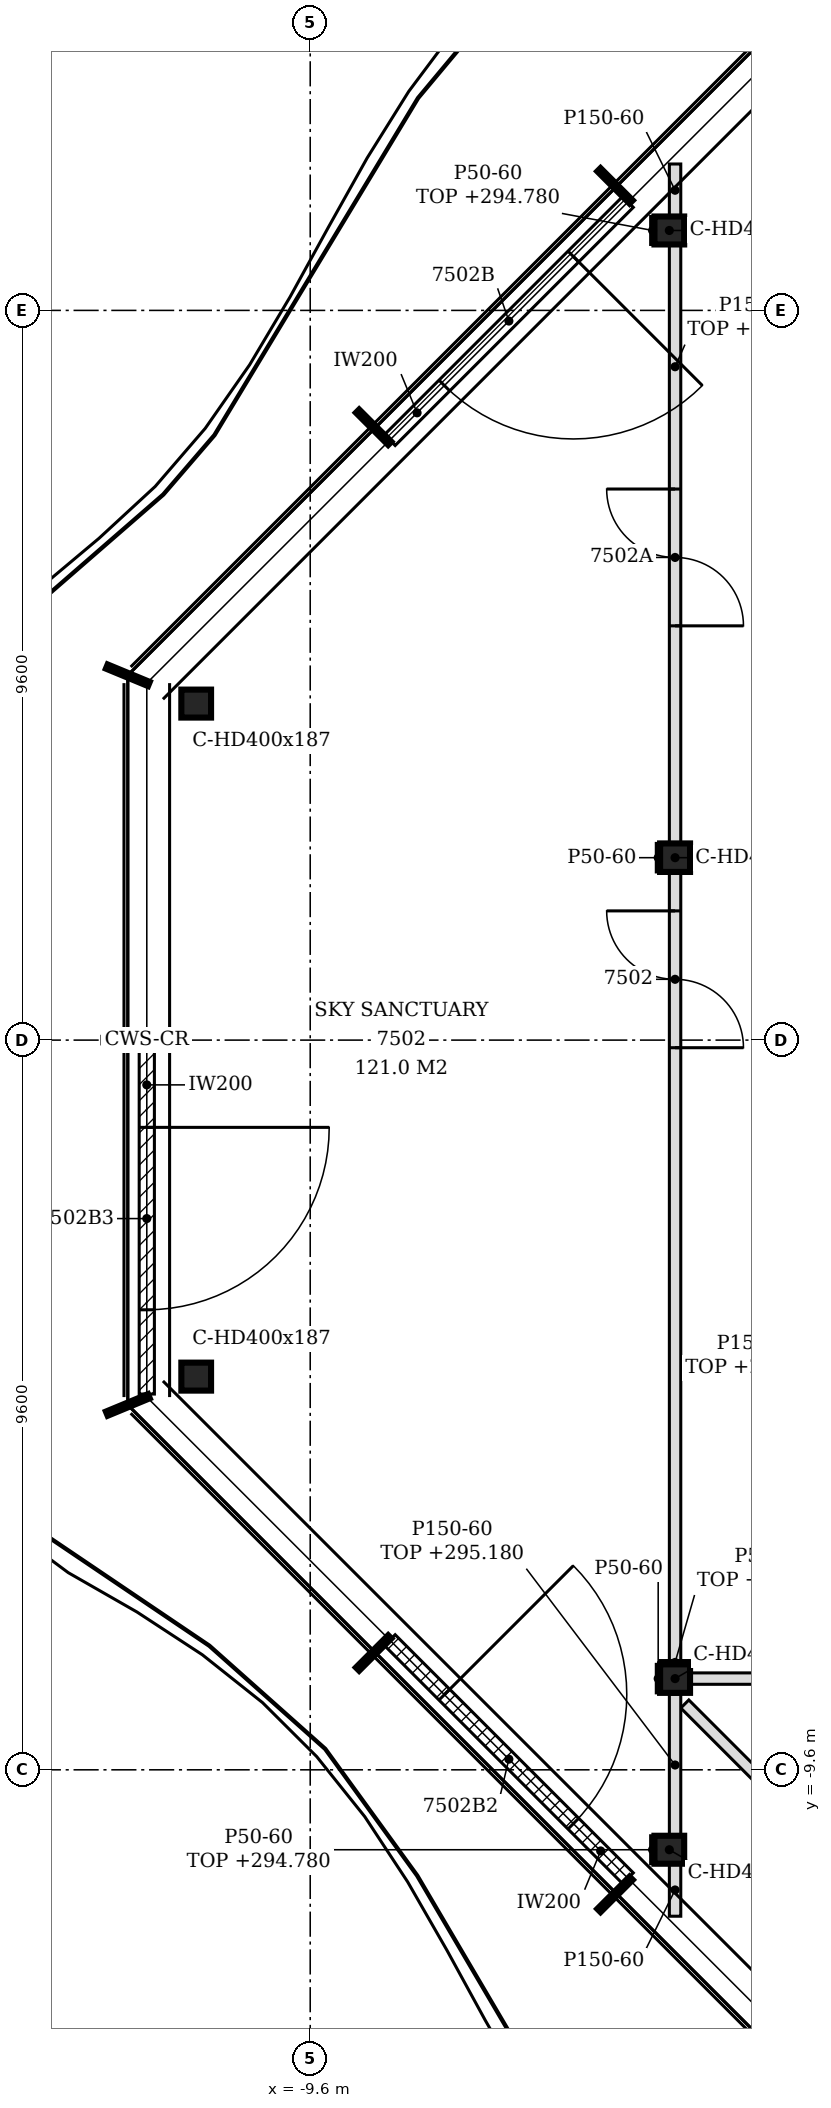
"""IFC4 building model, lengths in metres.
Left out: names, types, materials, properties, quantities, classifications, styles, units other than length and angle.
Written with IfcOpenShell. Run it as: python <this file> out.ifc"""

import sys

from ifc_helpers import new_model, si_unit, direction, frame, frame_2d, origin, origin_2d, place, context, subcontext, project, spatial, polyline, rectangle, i_section, outline, extrude, element, fill, save


model = new_model("IFC4")
c1 = context("Model", 3, precision=1e-05, world=origin(), true_north=direction((0.0, 1.0)))
c2 = subcontext(c1, "Body", "Model", "MODEL_VIEW")
j1 = project(units=[si_unit("LENGTHUNIT", "METRE"), si_unit("PLANEANGLEUNIT", "RADIAN")], contexts=[c1])
p1 = place(None, origin())
s1 = spatial("IfcSite", under=j1, at=p1, CompositionType="ELEMENT")
p2 = place(p1, origin())
s2 = spatial("IfcBuilding", under=s1, at=p2, CompositionType="ELEMENT")
p3 = place(p2, frame((0.0, 0.0, 292.2)))
s3 = spatial("IfcBuildingStorey", under=s2, at=p3, CompositionType="ELEMENT", Elevation=292.2)
for number, where, z_axis, x_axis in (
    (1, (-4.876, 10.652, -0.15), (0.0, 0.0, 1.0), (1.0, 0.0, 0.0)),
    (2, (-11.1, 4.427, -0.15), (0.0, 0.0, 1.0), (1.0, 0.0, 0.0)),
    (3, (-11.1, -4.427, -0.15), (0.0, 0.0, 1.0), (1.0, 0.0, 0.0)),
    (4, (-4.876, -10.652, -0.15), (0.0, 0.0, 1.0), (1.0, 0.0, 0.0)),
):
    element("IfcColumn", number, at=place(p3, frame(where, z_axis=z_axis, x_axis=x_axis)), inside=s3, PredefinedType="COLUMN", context=c2, shape_type="SweptSolid", body=[
        extrude(i_section(OverallWidth=0.391, OverallDepth=0.368, WebThickness=0.015, FlangeThickness=0.024, FilletRadius=0.015, at=origin_2d()), origin(), (0.0, 0.0, 1.0), 3.55),
    ])
for number, where, z_axis, x_axis in (
    (5, (-4.8, -8.4, -0.15), (0.0, 0.0, 1.0), (1.0, 0.0, 0.0)),
    (6, (-4.8, 2.4, -0.15), (0.0, 0.0, 1.0), (1.0, 0.0, 0.0)),
):
    element("IfcColumn", number, at=place(p3, frame(where, z_axis=z_axis, x_axis=x_axis)), inside=s3, PredefinedType="COLUMN", context=c2, shape_type="SweptSolid", body=[
        extrude(i_section(OverallWidth=0.394, OverallDepth=0.375, WebThickness=0.017, FlangeThickness=0.028, FilletRadius=0.015, at=origin_2d()), origin(), (0.0, 0.0, 1.0), 3.55),
    ])
p4 = place(p3, frame((-5.42, 11.026, 0.0), z_axis=(0.0, 0.0, 1.0), x_axis=(-0.707134329907, -0.707079231393, 0.0)))
e7 = element("IfcWall", 7, at=p4, inside=s3, PredefinedType="NOTDEFINED", context=c2, shape_type="SweptSolid", body=[
    extrude(rectangle(XDim=4.431, YDim=0.2, at=frame_2d((2.215, 0.0))), origin(), (0.0, 0.0, 1.0), 3.4),
])
p5 = place(p4, frame((1.015, 0.0, 0.0)))
e8 = element("IfcOpeningElement", 8, at=p5, cuts=e7, PredefinedType="OPENING", context=c2, shape_type="SweptSolid", body=[
    extrude(rectangle(XDim=2.4, YDim=2.4, at=frame_2d((1.2, 1.2))), frame((0.0, 0.11, 0.0), z_axis=(0.0, -1.0, 0.0), x_axis=(1.0, 0.0, 0.0)), (0.0, 0.0, 1.0), 0.22),
])
p6 = place(p3, frame((-11.75, -0.03, 0.0), z_axis=(0.0, 0.0, 1.0), x_axis=(0.0, -1.0, 0.0)))
e9 = element("IfcWall", 9, at=p6, inside=s3, PredefinedType="NOTDEFINED", context=c2, shape_type="SweptSolid", body=[
    extrude(rectangle(XDim=4.626, YDim=0.2, at=frame_2d((2.313, 0.0))), origin(), (0.0, 0.0, 1.0), 3.4),
])
p7 = place(p6, frame((1.118, 0.0, 0.0)))
e10 = element("IfcOpeningElement", 10, at=p7, cuts=e9, PredefinedType="OPENING", context=c2, shape_type="SweptSolid", body=[
    extrude(rectangle(XDim=2.4, YDim=2.4, at=frame_2d((1.2, 1.2))), frame((0.0, 0.11, 0.0), z_axis=(0.0, -1.0, 0.0), x_axis=(1.0, 0.0, 0.0)), (0.0, 0.0, 1.0), 0.22),
])
p8 = place(p3, frame((-8.553, -7.893, 0.0), z_axis=(0.0, 0.0, 1.0), x_axis=(0.707134329907, -0.707079231393, 0.0)))
e11 = element("IfcWall", 11, at=p8, inside=s3, PredefinedType="NOTDEFINED", context=c2, shape_type="SweptSolid", body=[
    extrude(rectangle(XDim=4.431, YDim=0.2, at=frame_2d((2.215, 0.0))), origin(), (0.0, 0.0, 1.0), 3.4),
])
p9 = place(p8, frame((1.015, 0.0, 0.0)))
e12 = element("IfcOpeningElement", 12, at=p9, cuts=e11, PredefinedType="OPENING", context=c2, shape_type="SweptSolid", body=[
    extrude(rectangle(XDim=2.4, YDim=2.4, at=frame_2d((1.2, 1.2))), frame((0.0, 0.11, 0.0), z_axis=(0.0, -1.0, 0.0), x_axis=(1.0, 0.0, 0.0)), (0.0, 0.0, 1.0), 0.22),
])
p10 = place(p3, frame((-1.534, -11.872, 0.0), z_axis=(0.0, 0.0, 1.0), x_axis=(-0.707106781187, 0.707106781187, 0.0)))
e13 = element("IfcWall", 13, at=p10, inside=s3, PredefinedType="PARTITIONING", context=c2, shape_type="SweptSolid", body=[
    extrude(rectangle(XDim=4.438, YDim=0.15, at=frame_2d((2.219, 0.0))), origin(), (0.0, 0.0, 1.0), 2.98),
])
p11 = place(p3, frame((-4.8, -11.526, 0.0), z_axis=(0.0, 0.0, 1.0), x_axis=(0.0, 1.0, 0.0)))
e14 = element("IfcWall", 14, at=p11, inside=s3, PredefinedType="PARTITIONING", context=c2, shape_type="SweptSolid", body=[
    extrude(outline(polyline([(0.0, 0.0), (0.691, 0.0), (0.691, 2.58), (0.229, 2.58), (0.227, 3.4), (0.0, 3.4), (0.0, 0.0)])), frame((0.0, 0.075, 0.0), z_axis=(0.0, -1.0, 0.0), x_axis=(1.0, 0.0, 0.0)), (0.0, 0.0, 1.0), 0.15),
])
p12 = place(p3, frame((-4.8, -10.468, 0.0), z_axis=(0.0, 0.0, 1.0), x_axis=(0.0, 1.0, 0.0)))
e15 = element("IfcWall", 15, at=p12, inside=s3, PredefinedType="PARTITIONING", context=c2, shape_type="SweptSolid", body=[
    extrude(outline(polyline([(0.0, 0.0), (1.862, 0.0), (1.862, 2.98), (0.31, 2.98), (0.308, 2.58), (0.066, 2.58), (0.064, 2.98), (0.0, 2.98), (0.0, 0.0)])), frame((0.0, 0.075, 0.0), z_axis=(0.0, -1.0, 0.0), x_axis=(1.0, 0.0, 0.0)), (0.0, 0.0, 1.0), 0.15),
])
p13 = place(p3, frame((-4.603, -8.4, 0.0), z_axis=(0.0, 0.0, 1.0), x_axis=(1.0, 0.0, 0.0)))
e16 = element("IfcWall", 16, at=p13, inside=s3, PredefinedType="PARTITIONING", context=c2, shape_type="SweptSolid", body=[
    extrude(rectangle(XDim=9.478, YDim=0.15, at=frame_2d((4.739, 0.0))), origin(), (0.0, 0.0, 1.0), 2.78),
])
p14 = place(p13, frame((4.153, 0.0, 0.0)))
e17 = element("IfcOpeningElement", 17, at=p14, cuts=e16, PredefinedType="OPENING", context=c2, shape_type="SweptSolid", body=[
    extrude(rectangle(XDim=0.9, YDim=2.1, at=frame_2d((0.45, 1.05))), frame((0.0, 0.085, 0.0), z_axis=(0.0, -1.0, 0.0), x_axis=(1.0, 0.0, 0.0)), (0.0, 0.0, 1.0), 0.17),
])
p15 = place(p3, frame((-4.8, -8.212, 0.0), z_axis=(0.0, 0.0, 1.0), x_axis=(0.0, 1.0, 0.0)))
e18 = element("IfcWall", 18, at=p15, inside=s3, PredefinedType="PARTITIONING", context=c2, shape_type="SweptSolid", body=[
    extrude(rectangle(XDim=10.425, YDim=0.15, at=frame_2d((5.212, 0.0))), origin(), (0.0, 0.0, 1.0), 2.78),
])
p16 = place(p15, frame((8.113, 0.0, 0.0)))
e19 = element("IfcOpeningElement", 19, at=p16, cuts=e18, PredefinedType="OPENING", context=c2, shape_type="SweptSolid", body=[
    extrude(rectangle(XDim=1.8, YDim=2.1, at=frame_2d((0.9, 1.05))), frame((0.0, 0.085, 0.0), z_axis=(0.0, -1.0, 0.0), x_axis=(1.0, 0.0, 0.0)), (0.0, 0.0, 1.0), 0.17),
])
p17 = place(p3, frame((-4.8, 2.587, 0.0), z_axis=(0.0, 0.0, 1.0), x_axis=(0.0, 1.0, 0.0)))
e20 = element("IfcWall", 20, at=p17, inside=s3, PredefinedType="PARTITIONING", context=c2, shape_type="SweptSolid", body=[
    extrude(outline(polyline([(0.0, 0.0), (7.88, 0.0), (7.88, 2.88), (7.814, 2.88), (7.812, 2.58), (7.57, 2.58), (7.568, 2.88), (0.0, 2.88), (0.0, 0.0)])), frame((0.0, 0.075, 0.0), z_axis=(0.0, -1.0, 0.0), x_axis=(1.0, 0.0, 0.0)), (0.0, 0.0, 1.0), 0.15),
])
p18 = place(p17, frame((2.863, 0.0, 0.0)))
e21 = element("IfcOpeningElement", 21, at=p18, cuts=e20, PredefinedType="OPENING", context=c2, shape_type="SweptSolid", body=[
    extrude(rectangle(XDim=1.8, YDim=2.1, at=frame_2d((0.9, 1.05))), frame((0.0, 0.085, 0.0), z_axis=(0.0, -1.0, 0.0), x_axis=(1.0, 0.0, 0.0)), (0.0, 0.0, 1.0), 0.17),
])
p19 = place(p3, frame((-4.8, 10.835, 0.0), z_axis=(0.0, 0.0, 1.0), x_axis=(0.0, 1.0, 0.0)))
e22 = element("IfcWall", 22, at=p19, inside=s3, PredefinedType="PARTITIONING", context=c2, shape_type="SweptSolid", body=[
    extrude(outline(polyline([(0.0, 0.0), (0.691, 0.0), (0.691, 3.4), (0.462, 3.4), (0.46, 2.58), (0.0, 2.58), (0.0, 0.0)])), frame((0.0, 0.075, 0.0), z_axis=(0.0, -1.0, 0.0), x_axis=(1.0, 0.0, 0.0)), (0.0, 0.0, 1.0), 0.15),
])
p20 = place(p3, frame((-5.096, -10.835, 0.0), z_axis=(0.0, 0.0, 1.0), x_axis=(0.0, 1.0, 0.0)))
e23 = element("IfcWall", 23, at=p20, inside=s3, PredefinedType="PARTITIONING", context=c2, shape_type="SweptSolid", body=[
    extrude(rectangle(XDim=0.368, YDim=0.05, at=frame_2d((0.184, 0.0))), origin(), (0.0, 0.0, 1.0), 2.58),
])
for number, where, z_axis, x_axis in (
    (24, (-5.022, -8.587, 0.0), (0.0, 0.0, 1.0), (0.0, 1.0, 0.0)),
    (25, (-5.022, 2.212, 0.0), (0.0, 0.0, 1.0), (0.0, 1.0, 0.0)),
):
    element("IfcWall", number, at=place(p3, frame(where, z_axis=z_axis, x_axis=x_axis)), inside=s3, PredefinedType="PARTITIONING", context=c2, shape_type="SweptSolid", body=[
        extrude(rectangle(XDim=0.375, YDim=0.05, at=frame_2d((0.188, 0.0))), origin(), (0.0, 0.0, 1.0), 3.4),
    ])
p21 = place(p3, frame((-5.096, 10.468, 0.0), z_axis=(0.0, 0.0, 1.0), x_axis=(0.0, 1.0, 0.0)))
e26 = element("IfcWall", 26, at=p21, inside=s3, PredefinedType="PARTITIONING", context=c2, shape_type="SweptSolid", body=[
    extrude(rectangle(XDim=0.368, YDim=0.05, at=frame_2d((0.184, 0.0))), origin(), (0.0, 0.0, 1.0), 2.58),
])
p22 = place(p3, frame((-4.997, -8.188, 0.0), z_axis=(0.0, 0.0, 1.0), x_axis=(1.0, 0.0, 0.0)))
e27 = element("IfcWall", 27, at=p22, inside=s3, PredefinedType="PARTITIONING", context=c2, shape_type="SweptSolid", body=[
    extrude(rectangle(XDim=0.394, YDim=0.05, at=frame_2d((0.197, 0.0))), origin(), (0.0, 0.0, 1.0), 2.78),
])
p23 = place(p5, origin())
e28 = element("IfcDoor", 28, at=p23, inside=s3, OperationType="SINGLE_SWING_LEFT", PredefinedType="DOOR", context=c2, shape_type="SweptSolid", body=[
    extrude(rectangle(XDim=2.4, YDim=2.4, at=frame_2d((1.2, 1.2))), frame((0.0, 0.025, 0.0), z_axis=(0.0, -1.0, 0.0), x_axis=(1.0, 0.0, 0.0)), (0.0, 0.0, 1.0), 0.05),
])
fill(e8, e28)
p24 = place(p7, origin())
e29 = element("IfcDoor", 29, at=p24, inside=s3, OperationType="SINGLE_SWING_LEFT", PredefinedType="DOOR", context=c2, shape_type="SweptSolid", body=[
    extrude(rectangle(XDim=2.4, YDim=2.4, at=frame_2d((1.2, 1.2))), frame((0.0, 0.025, 0.0), z_axis=(0.0, -1.0, 0.0), x_axis=(1.0, 0.0, 0.0)), (0.0, 0.0, 1.0), 0.05),
])
fill(e10, e29)
p25 = place(p9, origin())
e30 = element("IfcDoor", 30, at=p25, inside=s3, OperationType="SINGLE_SWING_LEFT", PredefinedType="DOOR", context=c2, shape_type="SweptSolid", body=[
    extrude(rectangle(XDim=2.4, YDim=2.4, at=frame_2d((1.2, 1.2))), frame((0.0, 0.025, 0.0), z_axis=(0.0, -1.0, 0.0), x_axis=(1.0, 0.0, 0.0)), (0.0, 0.0, 1.0), 0.05),
])
fill(e12, e30)
p26 = place(p16, origin())
e31 = element("IfcDoor", 31, at=p26, inside=s3, OperationType="DOUBLE_DOOR_SINGLE_SWING", PredefinedType="DOOR", context=c2, shape_type="SweptSolid", body=[
    extrude(rectangle(XDim=1.8, YDim=2.1, at=frame_2d((0.9, 1.05))), frame((0.0, 0.025, 0.0), z_axis=(0.0, -1.0, 0.0), x_axis=(1.0, 0.0, 0.0)), (0.0, 0.0, 1.0), 0.05),
])
fill(e19, e31)
p27 = place(p18, origin())
e32 = element("IfcDoor", 32, at=p27, inside=s3, OperationType="DOUBLE_DOOR_SINGLE_SWING", PredefinedType="DOOR", context=c2, shape_type="SweptSolid", body=[
    extrude(rectangle(XDim=1.8, YDim=2.1, at=frame_2d((0.9, 1.05))), frame((0.0, 0.025, 0.0), z_axis=(0.0, -1.0, 0.0), x_axis=(1.0, 0.0, 0.0)), (0.0, 0.0, 1.0), 0.05),
])
fill(e21, e32)
save(model, sys.argv[1])
